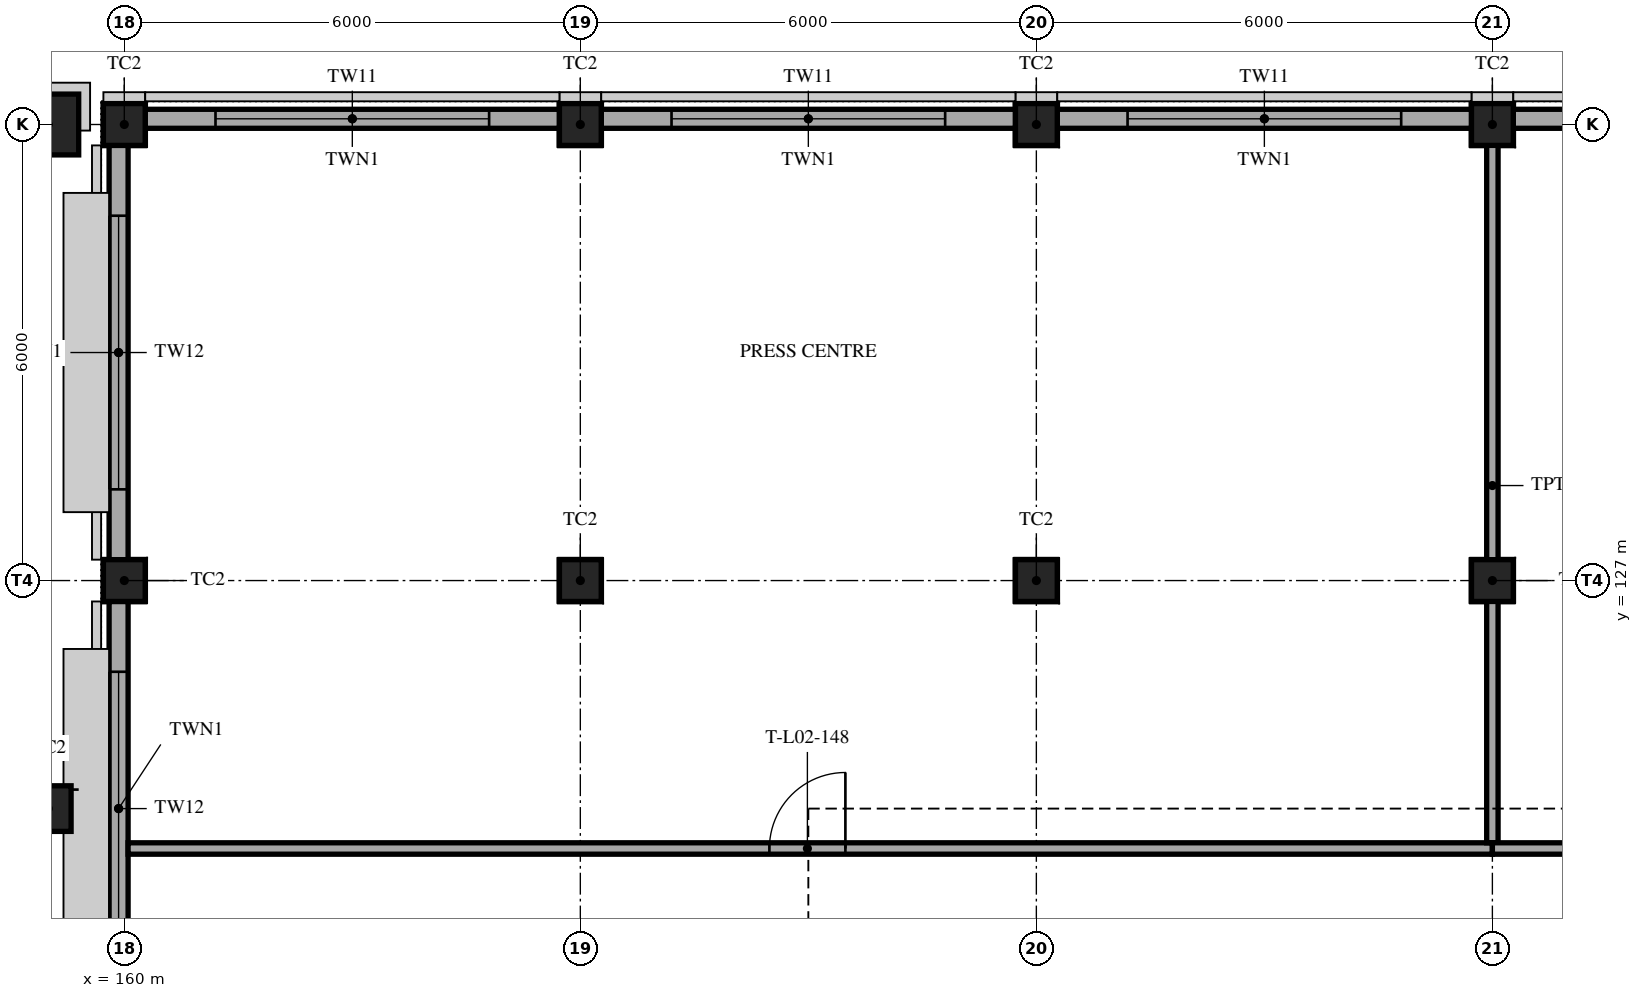
"""IFC4 building model, lengths in metres.
Left out: names, types, materials, properties, quantities, classifications, styles, units other than length and angle.
Written with IfcOpenShell. Run it as: python <this file> out.ifc"""

import sys

from ifc_helpers import new_model, si_unit, direction, frame, frame_2d, origin, origin_2d, place, context, subcontext, project, spatial, polyline, rectangle, hollow_rectangle, outline, extrude, element, fill, save


model = new_model("IFC4")
c1 = context("Model", 3, precision=1e-05, world=origin(), true_north=direction((0.0, 1.0)))
c2 = subcontext(c1, "Body", "Model", "MODEL_VIEW")
j1 = project(units=[si_unit("LENGTHUNIT", "METRE"), si_unit("PLANEANGLEUNIT", "RADIAN")], contexts=[c1])
p1 = place(None, origin())
s1 = spatial("IfcSite", under=j1, at=p1, CompositionType="ELEMENT")
p2 = place(p1, origin())
s2 = spatial("IfcBuilding", under=s1, at=p2, CompositionType="ELEMENT")
p3 = place(p2, frame((0.0, 0.0, 10.0)))
s3 = spatial("IfcBuildingStorey", under=s2, at=p3, CompositionType="ELEMENT", Elevation=10.0)
for number, where, z_axis, x_axis in (
    (1, (160.0, 127.0, 0.0), (0.0, 0.0, 1.0), (1.0, 0.0, 0.0)),
    (2, (160.0, 133.0, 0.0), (0.0, 0.0, 1.0), (1.0, 0.0, 0.0)),
    (3, (166.0, 133.0, 0.0), (0.0, 0.0, 1.0), (1.0, 0.0, 0.0)),
    (4, (172.0, 133.0, 0.0), (0.0, 0.0, 1.0), (1.0, 0.0, 0.0)),
    (5, (178.0, 133.0, 0.0), (0.0, 0.0, 1.0), (1.0, 0.0, 0.0)),
    (6, (166.0, 127.0, 0.0), (0.0, 0.0, 1.0), (1.0, 0.0, 0.0)),
    (7, (172.0, 127.0, 0.0), (0.0, 0.0, 1.0), (1.0, 0.0, 0.0)),
    (8, (178.0, 127.0, 0.0), (0.0, 0.0, 1.0), (1.0, 0.0, 0.0)),
):
    element("IfcColumn", number, at=place(p3, frame(where, z_axis=z_axis, x_axis=x_axis)), inside=s3, PredefinedType="COLUMN", context=c2, shape_type="SweptSolid", body=[
        extrude(hollow_rectangle(XDim=0.55, YDim=0.55, WallThickness=0.032, at=origin_2d()), origin(), (0.0, 0.0, 1.0), 5.0),
    ])
p4 = place(p3, frame((159.0, 124.0, 0.0), z_axis=(0.0, 0.0, 1.0), x_axis=(1.0, 0.0, 0.0)))
e9 = element("IfcColumn", 9, at=p4, inside=s3, PredefinedType="COLUMN", context=c2, shape_type="SweptSolid", body=[
    extrude(rectangle(XDim=0.6, YDim=0.6, at=origin_2d()), origin(), (0.0, 0.0, 1.0), 5.0),
])
p5 = place(p3, frame((159.0, 133.0, 0.0), z_axis=(0.0, 0.0, 1.0), x_axis=(1.0, 0.0, 0.0)))
e10 = element("IfcColumn", 10, at=p5, inside=s3, PredefinedType="COLUMN", context=c2, shape_type="SweptSolid", body=[
    extrude(rectangle(XDim=0.8, YDim=0.8, at=origin_2d()), origin(), (0.0, 0.0, 1.0), 5.0),
])
p6 = place(p3, frame((160.275, 133.075, 0.0), z_axis=(0.0, 0.0, 1.0), x_axis=(1.0, 0.0, 0.0)))
e11 = element("IfcWall", 11, at=p6, inside=s3, PredefinedType="SOLIDWALL", context=c2, shape_type="SweptSolid", body=[
    extrude(rectangle(XDim=5.45, YDim=0.25, at=frame_2d((2.725, 0.0))), origin(), (0.0, 0.0, 1.0), 4.35),
])
p7 = place(p6, frame((0.925, 0.0, 0.9)))
e12 = element("IfcOpeningElement", 12, at=p7, cuts=e11, PredefinedType="OPENING", context=c2, shape_type="SweptSolid", body=[
    extrude(rectangle(XDim=3.6, YDim=2.4, at=frame_2d((1.8, 1.2))), frame((0.0, 0.135, 0.0), z_axis=(0.0, -1.0, 0.0), x_axis=(1.0, 0.0, 0.0)), (0.0, 0.0, 1.0), 0.27),
])
p8 = place(p3, frame((166.275, 133.075, 0.0), z_axis=(0.0, 0.0, 1.0), x_axis=(1.0, 0.0, 0.0)))
e13 = element("IfcWall", 13, at=p8, inside=s3, PredefinedType="SOLIDWALL", context=c2, shape_type="SweptSolid", body=[
    extrude(rectangle(XDim=5.45, YDim=0.25, at=frame_2d((2.725, 0.0))), origin(), (0.0, 0.0, 1.0), 4.35),
])
p9 = place(p8, frame((0.925, 0.0, 0.9)))
e14 = element("IfcOpeningElement", 14, at=p9, cuts=e13, PredefinedType="OPENING", context=c2, shape_type="SweptSolid", body=[
    extrude(rectangle(XDim=3.6, YDim=2.4, at=frame_2d((1.8, 1.2))), frame((0.0, 0.135, 0.0), z_axis=(0.0, -1.0, 0.0), x_axis=(1.0, 0.0, 0.0)), (0.0, 0.0, 1.0), 0.27),
])
p10 = place(p3, frame((172.275, 133.075, 0.0), z_axis=(0.0, 0.0, 1.0), x_axis=(1.0, 0.0, 0.0)))
e15 = element("IfcWall", 15, at=p10, inside=s3, PredefinedType="SOLIDWALL", context=c2, shape_type="SweptSolid", body=[
    extrude(rectangle(XDim=5.45, YDim=0.25, at=frame_2d((2.725, 0.0))), origin(), (0.0, 0.0, 1.0), 4.35),
])
p11 = place(p10, frame((0.925, 0.0, 0.9)))
e16 = element("IfcOpeningElement", 16, at=p11, cuts=e15, PredefinedType="OPENING", context=c2, shape_type="SweptSolid", body=[
    extrude(rectangle(XDim=3.6, YDim=2.4, at=frame_2d((1.8, 1.2))), frame((0.0, 0.135, 0.0), z_axis=(0.0, -1.0, 0.0), x_axis=(1.0, 0.0, 0.0)), (0.0, 0.0, 1.0), 0.27),
])
p12 = place(p3, frame((178.275, 133.075, 0.0), z_axis=(0.0, 0.0, 1.0), x_axis=(1.0, 0.0, 0.0)))
e17 = element("IfcWall", 17, at=p12, inside=s3, PredefinedType="SOLIDWALL", context=c2, shape_type="SweptSolid", body=[
    extrude(rectangle(XDim=5.45, YDim=0.25, at=frame_2d((2.725, 0.0))), origin(), (0.0, 0.0, 1.0), 4.35),
])
p13 = place(p12, frame((0.925, 0.0, 0.9)))
e18 = element("IfcOpeningElement", 18, at=p13, cuts=e17, PredefinedType="OPENING", context=c2, shape_type="SweptSolid", body=[
    extrude(rectangle(XDim=3.6, YDim=2.4, at=frame_2d((1.8, 1.2))), frame((0.0, 0.135, 0.0), z_axis=(0.0, -1.0, 0.0), x_axis=(1.0, 0.0, 0.0)), (0.0, 0.0, 1.0), 0.27),
])
p14 = place(p3, frame((159.925, 121.275, 0.0), z_axis=(0.0, 0.0, 1.0), x_axis=(0.0, 1.0, 0.0)))
e19 = element("IfcWall", 19, at=p14, inside=s3, PredefinedType="SOLIDWALL", context=c2, shape_type="SweptSolid", body=[
    extrude(rectangle(XDim=5.45, YDim=0.25, at=frame_2d((2.725, 0.0))), origin(), (0.0, 0.0, 1.0), 4.35),
])
p15 = place(p14, frame((0.925, 0.0, 0.9)))
e20 = element("IfcOpeningElement", 20, at=p15, cuts=e19, PredefinedType="OPENING", context=c2, shape_type="SweptSolid", body=[
    extrude(rectangle(XDim=3.6, YDim=2.4, at=frame_2d((1.8, 1.2))), frame((0.0, 0.135, 0.0), z_axis=(0.0, -1.0, 0.0), x_axis=(1.0, 0.0, 0.0)), (0.0, 0.0, 1.0), 0.27),
])
p16 = place(p3, frame((159.925, 127.275, 0.0), z_axis=(0.0, 0.0, 1.0), x_axis=(0.0, 1.0, 0.0)))
e21 = element("IfcWall", 21, at=p16, inside=s3, PredefinedType="SOLIDWALL", context=c2, shape_type="SweptSolid", body=[
    extrude(rectangle(XDim=5.45, YDim=0.25, at=frame_2d((2.725, 0.0))), origin(), (0.0, 0.0, 1.0), 4.35),
])
p17 = place(p16, frame((0.925, 0.0, 0.9)))
e22 = element("IfcOpeningElement", 22, at=p17, cuts=e21, PredefinedType="OPENING", context=c2, shape_type="SweptSolid", body=[
    extrude(rectangle(XDim=3.6, YDim=2.4, at=frame_2d((1.8, 1.2))), frame((0.0, 0.135, 0.0), z_axis=(0.0, -1.0, 0.0), x_axis=(1.0, 0.0, 0.0)), (0.0, 0.0, 1.0), 0.27),
])
p18 = place(p3, frame((160.05, 123.475, 0.0), z_axis=(0.0, 0.0, 1.0), x_axis=(1.0, 0.0, 0.0)))
e23 = element("IfcWall", 23, at=p18, inside=s3, PredefinedType="PARTITIONING", context=c2, shape_type="SweptSolid", body=[
    extrude(rectangle(XDim=17.95, YDim=0.15, at=frame_2d((8.975, 0.0))), origin(), (0.0, 0.0, 1.0), 4.2),
])
p19 = place(p18, frame((8.438, 0.0, 0.0)))
e24 = element("IfcOpeningElement", 24, at=p19, cuts=e23, PredefinedType="OPENING", context=c2, shape_type="SweptSolid", body=[
    extrude(rectangle(XDim=1.0, YDim=2.1, at=frame_2d((0.5, 1.05))), frame((0.0, 0.085, 0.0), z_axis=(0.0, -1.0, 0.0), x_axis=(1.0, 0.0, 0.0)), (0.0, 0.0, 1.0), 0.17),
])
p20 = place(p3, frame((178.0, 123.55, 0.0), z_axis=(0.0, 0.0, 1.0), x_axis=(0.0, 1.0, 0.0)))
e25 = element("IfcWall", 25, at=p20, inside=s3, PredefinedType="PARTITIONING", context=c2, shape_type="SweptSolid", body=[
    extrude(rectangle(XDim=9.4, YDim=0.15, at=frame_2d((4.7, 0.0))), origin(), (0.0, 0.0, 1.0), 4.2),
])
p21 = place(p3, frame((178.0, 123.475, 0.0), z_axis=(0.0, 0.0, 1.0), x_axis=(1.0, 0.0, 0.0)))
e26 = element("IfcWall", 26, at=p21, inside=s3, PredefinedType="PARTITIONING", context=c2, shape_type="SweptSolid", body=[
    extrude(rectangle(XDim=18.0, YDim=0.15, at=frame_2d((9.0, 0.0))), origin(), (0.0, 0.0, 1.0), 4.2),
])
p22 = place(p21, frame((8.5, 0.0, 0.0)))
e27 = element("IfcOpeningElement", 27, at=p22, cuts=e26, PredefinedType="OPENING", context=c2, shape_type="SweptSolid", body=[
    extrude(rectangle(XDim=1.0, YDim=2.1, at=frame_2d((0.5, 1.05))), frame((0.0, 0.085, 0.0), z_axis=(0.0, -1.0, 0.0), x_axis=(1.0, 0.0, 0.0)), (0.0, 0.0, 1.0), 0.17),
])
p23 = place(p7, origin())
e28 = element("IfcWindow", 28, at=p23, inside=s3, PartitioningType="TRIPLE_PANEL_VERTICAL", PredefinedType="WINDOW", context=c2, shape_type="SweptSolid", body=[
    extrude(outline(polyline([(0.0, 0.0), (3.6, 0.0), (3.6, 2.4), (0.0, 2.4), (0.0, 0.0)]), holes=[polyline([(0.06, 0.06), (0.96, 0.06), (0.96, 2.34), (0.06, 2.34), (0.06, 0.06)]), polyline([(1.06, 0.06), (2.54, 0.06), (2.54, 2.34), (1.06, 2.34), (1.06, 0.06)]), polyline([(2.64, 0.06), (3.54, 0.06), (3.54, 2.34), (2.64, 2.34), (2.64, 0.06)])]), frame((0.0, 0.03, 0.0), z_axis=(0.0, -1.0, 0.0), x_axis=(1.0, 0.0, 0.0)), (0.0, 0.0, 1.0), 0.06),
    extrude(rectangle(XDim=0.924, YDim=2.304, at=frame_2d((0.51, 1.2))), frame((0.0, 0.01, 0.0), z_axis=(0.0, -1.0, 0.0), x_axis=(1.0, 0.0, 0.0)), (0.0, 0.0, 1.0), 0.02),
    extrude(rectangle(XDim=1.504, YDim=2.304, at=frame_2d((1.8, 1.2))), frame((0.0, 0.01, 0.0), z_axis=(0.0, -1.0, 0.0), x_axis=(1.0, 0.0, 0.0)), (0.0, 0.0, 1.0), 0.02),
    extrude(rectangle(XDim=0.924, YDim=2.304, at=frame_2d((3.09, 1.2))), frame((0.0, 0.01, 0.0), z_axis=(0.0, -1.0, 0.0), x_axis=(1.0, 0.0, 0.0)), (0.0, 0.0, 1.0), 0.02),
])
fill(e12, e28)
p24 = place(p9, origin())
e29 = element("IfcWindow", 29, at=p24, inside=s3, PartitioningType="TRIPLE_PANEL_VERTICAL", PredefinedType="WINDOW", context=c2, shape_type="SweptSolid", body=[
    extrude(outline(polyline([(0.0, 0.0), (3.6, 0.0), (3.6, 2.4), (0.0, 2.4), (0.0, 0.0)]), holes=[polyline([(0.06, 0.06), (0.96, 0.06), (0.96, 2.34), (0.06, 2.34), (0.06, 0.06)]), polyline([(1.06, 0.06), (2.54, 0.06), (2.54, 2.34), (1.06, 2.34), (1.06, 0.06)]), polyline([(2.64, 0.06), (3.54, 0.06), (3.54, 2.34), (2.64, 2.34), (2.64, 0.06)])]), frame((0.0, 0.03, 0.0), z_axis=(0.0, -1.0, 0.0), x_axis=(1.0, 0.0, 0.0)), (0.0, 0.0, 1.0), 0.06),
    extrude(rectangle(XDim=0.924, YDim=2.304, at=frame_2d((0.51, 1.2))), frame((0.0, 0.01, 0.0), z_axis=(0.0, -1.0, 0.0), x_axis=(1.0, 0.0, 0.0)), (0.0, 0.0, 1.0), 0.02),
    extrude(rectangle(XDim=1.504, YDim=2.304, at=frame_2d((1.8, 1.2))), frame((0.0, 0.01, 0.0), z_axis=(0.0, -1.0, 0.0), x_axis=(1.0, 0.0, 0.0)), (0.0, 0.0, 1.0), 0.02),
    extrude(rectangle(XDim=0.924, YDim=2.304, at=frame_2d((3.09, 1.2))), frame((0.0, 0.01, 0.0), z_axis=(0.0, -1.0, 0.0), x_axis=(1.0, 0.0, 0.0)), (0.0, 0.0, 1.0), 0.02),
])
fill(e14, e29)
p25 = place(p11, origin())
e30 = element("IfcWindow", 30, at=p25, inside=s3, PartitioningType="TRIPLE_PANEL_VERTICAL", PredefinedType="WINDOW", context=c2, shape_type="SweptSolid", body=[
    extrude(outline(polyline([(0.0, 0.0), (3.6, 0.0), (3.6, 2.4), (0.0, 2.4), (0.0, 0.0)]), holes=[polyline([(0.06, 0.06), (0.96, 0.06), (0.96, 2.34), (0.06, 2.34), (0.06, 0.06)]), polyline([(1.06, 0.06), (2.54, 0.06), (2.54, 2.34), (1.06, 2.34), (1.06, 0.06)]), polyline([(2.64, 0.06), (3.54, 0.06), (3.54, 2.34), (2.64, 2.34), (2.64, 0.06)])]), frame((0.0, 0.03, 0.0), z_axis=(0.0, -1.0, 0.0), x_axis=(1.0, 0.0, 0.0)), (0.0, 0.0, 1.0), 0.06),
    extrude(rectangle(XDim=0.924, YDim=2.304, at=frame_2d((0.51, 1.2))), frame((0.0, 0.01, 0.0), z_axis=(0.0, -1.0, 0.0), x_axis=(1.0, 0.0, 0.0)), (0.0, 0.0, 1.0), 0.02),
    extrude(rectangle(XDim=1.504, YDim=2.304, at=frame_2d((1.8, 1.2))), frame((0.0, 0.01, 0.0), z_axis=(0.0, -1.0, 0.0), x_axis=(1.0, 0.0, 0.0)), (0.0, 0.0, 1.0), 0.02),
    extrude(rectangle(XDim=0.924, YDim=2.304, at=frame_2d((3.09, 1.2))), frame((0.0, 0.01, 0.0), z_axis=(0.0, -1.0, 0.0), x_axis=(1.0, 0.0, 0.0)), (0.0, 0.0, 1.0), 0.02),
])
fill(e16, e30)
p26 = place(p15, origin())
e31 = element("IfcWindow", 31, at=p26, inside=s3, PartitioningType="TRIPLE_PANEL_VERTICAL", PredefinedType="WINDOW", context=c2, shape_type="SweptSolid", body=[
    extrude(outline(polyline([(0.0, 0.0), (3.6, 0.0), (3.6, 2.4), (0.0, 2.4), (0.0, 0.0)]), holes=[polyline([(0.06, 0.06), (0.96, 0.06), (0.96, 2.34), (0.06, 2.34), (0.06, 0.06)]), polyline([(1.06, 0.06), (2.54, 0.06), (2.54, 2.34), (1.06, 2.34), (1.06, 0.06)]), polyline([(2.64, 0.06), (3.54, 0.06), (3.54, 2.34), (2.64, 2.34), (2.64, 0.06)])]), frame((0.0, 0.03, 0.0), z_axis=(0.0, -1.0, 0.0), x_axis=(1.0, 0.0, 0.0)), (0.0, 0.0, 1.0), 0.06),
    extrude(rectangle(XDim=0.924, YDim=2.304, at=frame_2d((0.51, 1.2))), frame((0.0, 0.01, 0.0), z_axis=(0.0, -1.0, 0.0), x_axis=(1.0, 0.0, 0.0)), (0.0, 0.0, 1.0), 0.02),
    extrude(rectangle(XDim=1.504, YDim=2.304, at=frame_2d((1.8, 1.2))), frame((0.0, 0.01, 0.0), z_axis=(0.0, -1.0, 0.0), x_axis=(1.0, 0.0, 0.0)), (0.0, 0.0, 1.0), 0.02),
    extrude(rectangle(XDim=0.924, YDim=2.304, at=frame_2d((3.09, 1.2))), frame((0.0, 0.01, 0.0), z_axis=(0.0, -1.0, 0.0), x_axis=(1.0, 0.0, 0.0)), (0.0, 0.0, 1.0), 0.02),
])
fill(e20, e31)
p27 = place(p17, origin())
e32 = element("IfcWindow", 32, at=p27, inside=s3, PartitioningType="TRIPLE_PANEL_VERTICAL", PredefinedType="WINDOW", context=c2, shape_type="SweptSolid", body=[
    extrude(outline(polyline([(0.0, 0.0), (3.6, 0.0), (3.6, 2.4), (0.0, 2.4), (0.0, 0.0)]), holes=[polyline([(0.06, 0.06), (0.96, 0.06), (0.96, 2.34), (0.06, 2.34), (0.06, 0.06)]), polyline([(1.06, 0.06), (2.54, 0.06), (2.54, 2.34), (1.06, 2.34), (1.06, 0.06)]), polyline([(2.64, 0.06), (3.54, 0.06), (3.54, 2.34), (2.64, 2.34), (2.64, 0.06)])]), frame((0.0, 0.03, 0.0), z_axis=(0.0, -1.0, 0.0), x_axis=(1.0, 0.0, 0.0)), (0.0, 0.0, 1.0), 0.06),
    extrude(rectangle(XDim=0.924, YDim=2.304, at=frame_2d((0.51, 1.2))), frame((0.0, 0.01, 0.0), z_axis=(0.0, -1.0, 0.0), x_axis=(1.0, 0.0, 0.0)), (0.0, 0.0, 1.0), 0.02),
    extrude(rectangle(XDim=1.504, YDim=2.304, at=frame_2d((1.8, 1.2))), frame((0.0, 0.01, 0.0), z_axis=(0.0, -1.0, 0.0), x_axis=(1.0, 0.0, 0.0)), (0.0, 0.0, 1.0), 0.02),
    extrude(rectangle(XDim=0.924, YDim=2.304, at=frame_2d((3.09, 1.2))), frame((0.0, 0.01, 0.0), z_axis=(0.0, -1.0, 0.0), x_axis=(1.0, 0.0, 0.0)), (0.0, 0.0, 1.0), 0.02),
])
fill(e22, e32)
p28 = place(p19, origin())
e33 = element("IfcDoor", 33, at=p28, inside=s3, OperationType="SINGLE_SWING_RIGHT", PredefinedType="DOOR", context=c2, shape_type="SweptSolid", body=[
    extrude(rectangle(XDim=1.0, YDim=2.1, at=frame_2d((0.5, 1.05))), frame((0.0, 0.025, 0.0), z_axis=(0.0, -1.0, 0.0), x_axis=(1.0, 0.0, 0.0)), (0.0, 0.0, 1.0), 0.05),
])
fill(e24, e33)
save(model, sys.argv[1])
